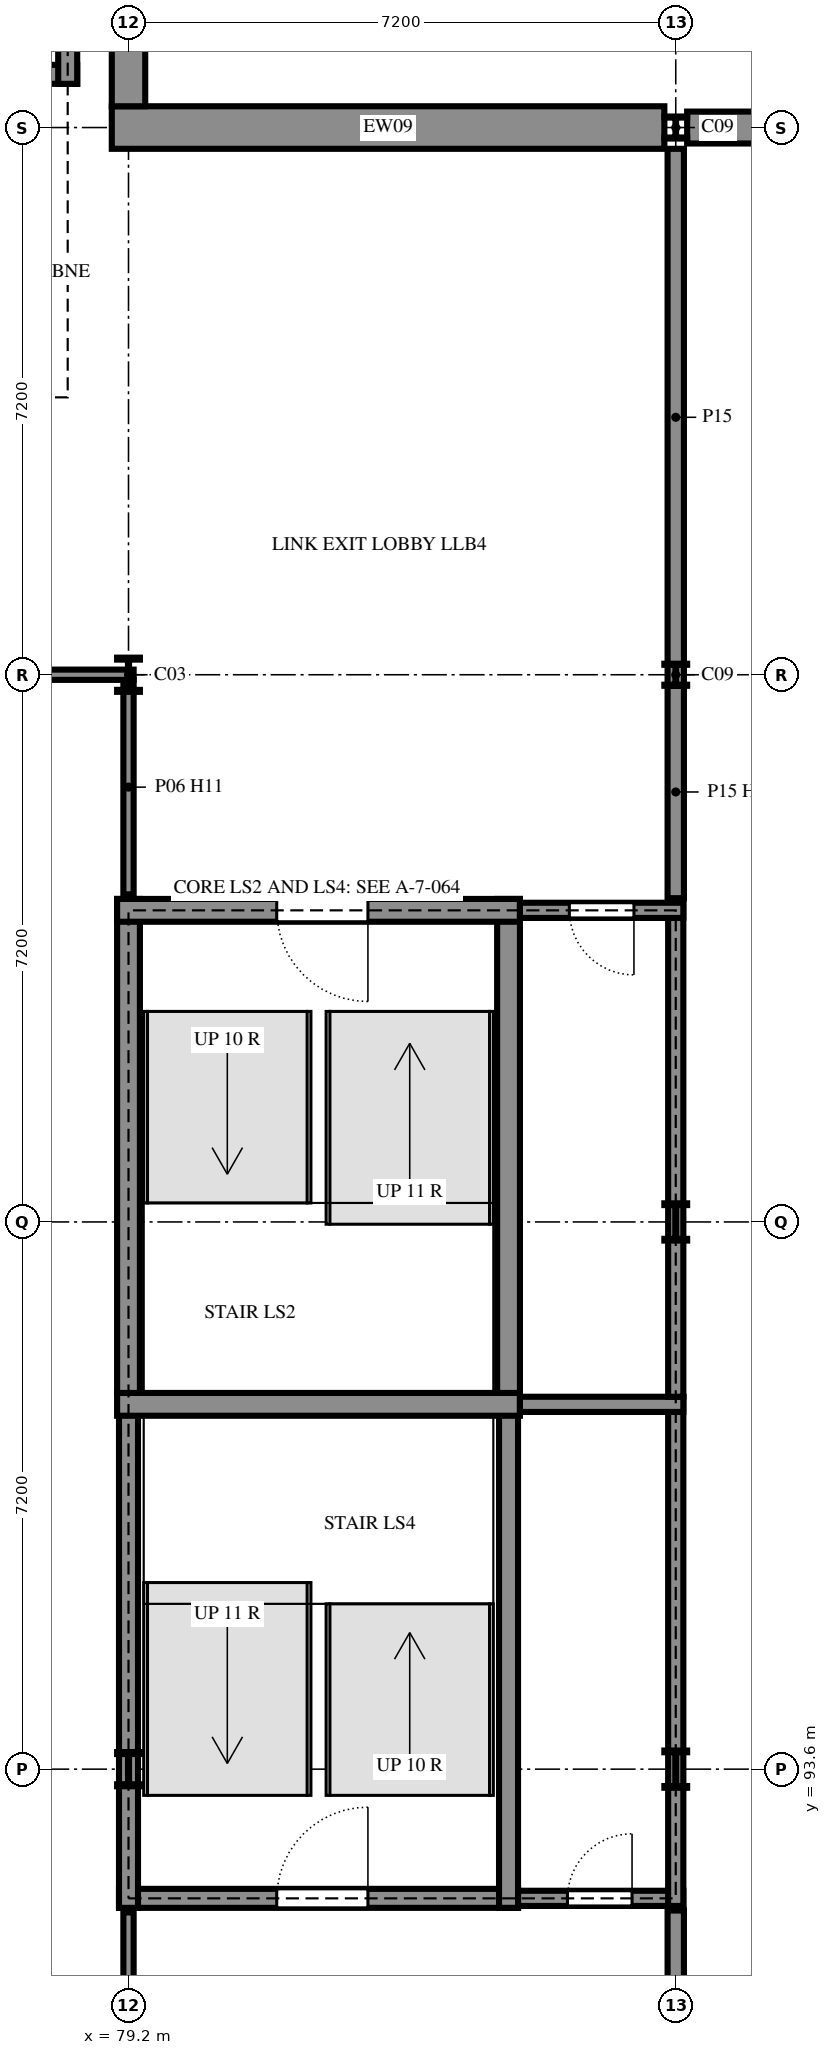
"""IFC4 building model, lengths in metres.
Left out: names, types, materials, properties, quantities, classifications, styles, units other than length and angle.
Written with IfcOpenShell. Run it as: python <this file> out.ifc"""

import sys

from ifc_helpers import new_model, si_unit, direction, frame, frame_2d, origin, origin_2d, place, context, subcontext, project, spatial, rectangle, i_section, extrude, element, fill, save


model = new_model("IFC4")
c1 = context("Model", 3, precision=1e-05, world=origin(), true_north=direction((0.0, 1.0)))
c2 = subcontext(c1, "Body", "Model", "MODEL_VIEW")
j1 = project(units=[si_unit("LENGTHUNIT", "METRE"), si_unit("PLANEANGLEUNIT", "RADIAN")], contexts=[c1])
p1 = place(None, origin())
s1 = spatial("IfcSite", under=j1, at=p1, CompositionType="ELEMENT")
p2 = place(p1, origin())
s2 = spatial("IfcBuilding", under=s1, at=p2, CompositionType="ELEMENT")
p3 = place(p2, frame((0.0, 0.0, 3.6)))
s3 = spatial("IfcBuildingStorey", under=s2, at=p3, CompositionType="ELEMENT", Elevation=3.6)
for number, where, z_axis, x_axis in (
    (1, (79.2, 93.6, 0.0), (0.0, 0.0, 1.0), (1.0, 0.0, 0.0)),
    (2, (79.2, 108.0, 0.0), (0.0, 0.0, 1.0), (1.0, 0.0, 0.0)),
):
    element("IfcColumn", number, at=place(p3, frame(where, z_axis=z_axis, x_axis=x_axis)), inside=s3, PredefinedType="COLUMN", context=c2, shape_type="SweptSolid", body=[
        extrude(i_section(OverallWidth=0.3, OverallDepth=0.45, WebThickness=0.014, FlangeThickness=0.026, FilletRadius=0.027, at=origin_2d()), origin(), (0.0, 0.0, 1.0), 3.6),
    ])
for number, where, z_axis, x_axis in (
    (3, (86.4, 93.6, 0.0), (0.0, 0.0, 1.0), (1.0, 0.0, 0.0)),
    (4, (86.4, 100.8, 0.0), (0.0, 0.0, 1.0), (1.0, 0.0, 0.0)),
):
    element("IfcColumn", number, at=place(p3, frame(where, z_axis=z_axis, x_axis=x_axis)), inside=s3, PredefinedType="COLUMN", context=c2, shape_type="SweptSolid", body=[
        extrude(i_section(OverallWidth=0.3, OverallDepth=0.49, WebThickness=0.012, FlangeThickness=0.023, FilletRadius=0.027, at=origin_2d()), origin(), (0.0, 0.0, 1.0), 3.6),
    ])
for number, where, z_axis, x_axis in (
    (5, (86.4, 108.0, 0.0), (0.0, 0.0, 1.0), (1.0, 0.0, 0.0)),
    (6, (86.4, 115.2, 0.0), (0.0, 0.0, 1.0), (1.0, 0.0, 0.0)),
):
    element("IfcColumn", number, at=place(p3, frame(where, z_axis=z_axis, x_axis=x_axis)), inside=s3, PredefinedType="COLUMN", context=c2, shape_type="SweptSolid", body=[
        extrude(i_section(OverallWidth=0.3, OverallDepth=0.29, WebThickness=0.009, FlangeThickness=0.014, FilletRadius=0.027, at=origin_2d()), origin(), (0.0, 0.0, 1.0), 3.6),
    ])
p4 = place(p3, frame((79.075, 91.9, 0.0), z_axis=(0.0, 0.0, 1.0), x_axis=(1.0, 0.0, 0.0)))
e7 = element("IfcWall", 7, at=p4, inside=s3, PredefinedType="SHEAR", context=c2, shape_type="SweptSolid", body=[
    extrude(rectangle(XDim=5.25, YDim=0.25, at=frame_2d((2.625, 0.0))), origin(), (0.0, 0.0, 1.0), 3.6),
])
p5 = place(p4, frame((2.075, 0.0, 0.0)))
e8 = element("IfcOpeningElement", 8, at=p5, cuts=e7, PredefinedType="OPENING", context=c2, shape_type="SweptSolid", body=[
    extrude(rectangle(XDim=1.2, YDim=2.4, at=frame_2d((0.6, 1.2))), frame((0.0, 0.135, 0.0), z_axis=(0.0, -1.0, 0.0), x_axis=(1.0, 0.0, 0.0)), (0.0, 0.0, 1.0), 0.27),
])
p6 = place(p3, frame((84.325, 91.9, 0.0), z_axis=(0.0, 0.0, 1.0), x_axis=(1.0, 0.0, 0.0)))
e9 = element("IfcWall", 9, at=p6, inside=s3, PredefinedType="SHEAR", context=c2, shape_type="SweptSolid", body=[
    extrude(rectangle(XDim=2.175, YDim=0.2, at=frame_2d((1.087, 0.0))), origin(), (0.0, 0.0, 1.0), 3.6),
])
p7 = place(p6, frame((0.65, 0.0, 0.0)))
e10 = element("IfcOpeningElement", 10, at=p7, cuts=e9, PredefinedType="OPENING", context=c2, shape_type="SweptSolid", body=[
    extrude(rectangle(XDim=0.85, YDim=2.1, at=frame_2d((0.425, 1.05))), frame((0.0, 0.11, 0.0), z_axis=(0.0, -1.0, 0.0), x_axis=(1.0, 0.0, 0.0)), (0.0, 0.0, 1.0), 0.22),
])
p8 = place(p3, frame((84.2, 91.775, 0.0), z_axis=(0.0, 0.0, 1.0), x_axis=(0.0, 1.0, 0.0)))
e11 = element("IfcWall", 11, at=p8, inside=s3, PredefinedType="SHEAR", context=c2, shape_type="SweptSolid", body=[
    extrude(rectangle(XDim=6.775, YDim=0.25, at=frame_2d((3.388, 0.0))), origin(), (0.0, 0.0, 1.0), 3.6),
])
p9 = place(p3, frame((86.4, 91.8, 0.0), z_axis=(0.0, 0.0, 1.0), x_axis=(0.0, 1.0, 0.0)))
e12 = element("IfcWall", 12, at=p9, inside=s3, PredefinedType="SHEAR", context=c2, shape_type="SweptSolid", body=[
    extrude(rectangle(XDim=6.7, YDim=0.2, at=frame_2d((3.35, 0.0))), origin(), (0.0, 0.0, 1.0), 3.6),
])
p10 = place(p3, frame((79.2, 98.55, 0.0), z_axis=(0.0, 0.0, 1.0), x_axis=(0.0, -1.0, 0.0)))
e13 = element("IfcWall", 13, at=p10, inside=s3, PredefinedType="SHEAR", context=c2, shape_type="SweptSolid", body=[
    extrude(rectangle(XDim=6.775, YDim=0.25, at=frame_2d((3.388, 0.0))), origin(), (0.0, 0.0, 1.0), 3.6),
])
p11 = place(p3, frame((84.35, 98.4, 0.0), z_axis=(0.0, 0.0, 1.0), x_axis=(-1.0, 0.0, 0.0)))
e14 = element("IfcWall", 14, at=p11, inside=s3, PredefinedType="SHEAR", context=c2, shape_type="SweptSolid", body=[
    extrude(rectangle(XDim=5.3, YDim=0.3, at=frame_2d((2.65, 0.0))), origin(), (0.0, 0.0, 1.0), 3.6),
])
p12 = place(p3, frame((84.35, 98.4, 0.0), z_axis=(0.0, 0.0, 1.0), x_axis=(1.0, 0.0, 0.0)))
e15 = element("IfcWall", 15, at=p12, inside=s3, PredefinedType="SHEAR", context=c2, shape_type="SweptSolid", body=[
    extrude(rectangle(XDim=2.15, YDim=0.2, at=frame_2d((1.075, 0.0))), origin(), (0.0, 0.0, 1.0), 3.6),
])
p13 = place(p3, frame((84.2, 98.55, 0.0), z_axis=(0.0, 0.0, 1.0), x_axis=(0.0, 1.0, 0.0)))
e16 = element("IfcWall", 16, at=p13, inside=s3, PredefinedType="SHEAR", context=c2, shape_type="SweptSolid", body=[
    extrude(rectangle(XDim=6.5, YDim=0.3, at=frame_2d((3.25, 0.0))), origin(), (0.0, 0.0, 1.0), 3.6),
])
p14 = place(p3, frame((86.4, 98.5, 0.0), z_axis=(0.0, 0.0, 1.0), x_axis=(0.0, 1.0, 0.0)))
e17 = element("IfcWall", 17, at=p14, inside=s3, PredefinedType="SHEAR", context=c2, shape_type="SweptSolid", body=[
    extrude(rectangle(XDim=6.5, YDim=0.2, at=frame_2d((3.25, 0.0))), origin(), (0.0, 0.0, 1.0), 3.6),
])
p15 = place(p3, frame((79.2, 105.05, 0.0), z_axis=(0.0, 0.0, 1.0), x_axis=(0.0, -1.0, 0.0)))
e18 = element("IfcWall", 18, at=p15, inside=s3, PredefinedType="SHEAR", context=c2, shape_type="SweptSolid", body=[
    extrude(rectangle(XDim=6.5, YDim=0.3, at=frame_2d((3.25, 0.0))), origin(), (0.0, 0.0, 1.0), 3.6),
])
p16 = place(p3, frame((84.35, 104.9, 0.0), z_axis=(0.0, 0.0, 1.0), x_axis=(-1.0, 0.0, 0.0)))
e19 = element("IfcWall", 19, at=p16, inside=s3, PredefinedType="SHEAR", context=c2, shape_type="SweptSolid", body=[
    extrude(rectangle(XDim=5.3, YDim=0.3, at=frame_2d((2.65, 0.0))), origin(), (0.0, 0.0, 1.0), 3.6),
])
p17 = place(p16, frame((2.0, 0.0, 0.0)))
e20 = element("IfcOpeningElement", 20, at=p17, cuts=e19, PredefinedType="OPENING", context=c2, shape_type="SweptSolid", body=[
    extrude(rectangle(XDim=1.2, YDim=2.4, at=frame_2d((0.6, 1.2))), frame((0.0, 0.16, 0.0), z_axis=(0.0, -1.0, 0.0), x_axis=(1.0, 0.0, 0.0)), (0.0, 0.0, 1.0), 0.32),
])
p18 = place(p3, frame((86.5, 104.9, 0.0), z_axis=(0.0, 0.0, 1.0), x_axis=(-1.0, 0.0, 0.0)))
e21 = element("IfcWall", 21, at=p18, inside=s3, PredefinedType="SHEAR", context=c2, shape_type="SweptSolid", body=[
    extrude(rectangle(XDim=2.15, YDim=0.2, at=frame_2d((1.075, 0.0))), origin(), (0.0, 0.0, 1.0), 3.6),
])
p19 = place(p18, frame((0.65, 0.0, 0.0)))
e22 = element("IfcOpeningElement", 22, at=p19, cuts=e21, PredefinedType="OPENING", context=c2, shape_type="SweptSolid", body=[
    extrude(rectangle(XDim=0.85, YDim=2.1, at=frame_2d((0.425, 1.05))), frame((0.0, 0.11, 0.0), z_axis=(0.0, -1.0, 0.0), x_axis=(1.0, 0.0, 0.0)), (0.0, 0.0, 1.0), 0.22),
])
p20 = place(p3, frame((73.525, 115.9, 0.0), z_axis=(0.0, 0.0, 1.0), x_axis=(1.0, 0.0, 0.0)))
e23 = element("IfcWall", 23, at=p20, inside=s3, PredefinedType="SHEAR", context=c2, shape_type="SweptSolid", body=[
    extrude(rectangle(XDim=5.0, YDim=0.25, at=frame_2d((2.5, 0.0))), origin(), (0.0, 0.0, 1.0), 3.6),
])
p21 = place(p20, frame((1.825, 0.0, 0.0)))
e24 = element("IfcOpeningElement", 24, at=p21, cuts=e23, PredefinedType="OPENING", context=c2, shape_type="SweptSolid", body=[
    extrude(rectangle(XDim=1.2, YDim=2.4, at=frame_2d((0.6, 1.2))), frame((0.0, 0.135, 0.0), z_axis=(0.0, -1.0, 0.0), x_axis=(1.0, 0.0, 0.0)), (0.0, 0.0, 1.0), 0.27),
])
p22 = place(p3, frame((78.4, 115.775, 0.0), z_axis=(0.0, 0.0, 1.0), x_axis=(0.0, 1.0, 0.0)))
e25 = element("IfcWall", 25, at=p22, inside=s3, PredefinedType="SHEAR", context=c2, shape_type="SweptSolid", body=[
    extrude(rectangle(XDim=6.75, YDim=0.25, at=frame_2d((3.375, 0.0))), origin(), (0.0, 0.0, 1.0), 3.6),
])
p23 = place(p3, frame((93.45, 115.2, 0.0), z_axis=(0.0, 0.0, 1.0), x_axis=(-1.0, 0.0, 0.0)))
e26 = element("IfcWall", 26, at=p23, inside=s3, PredefinedType="SOLIDWALL", context=c2, shape_type="SweptSolid", body=[
    extrude(rectangle(XDim=6.9, YDim=0.42, at=frame_2d((3.45, 0.0))), origin(), (0.0, 0.0, 1.0), 3.6),
])
p24 = place(p3, frame((86.25, 115.2, 0.0), z_axis=(0.0, 0.0, 1.0), x_axis=(-1.0, 0.0, 0.0)))
e27 = element("IfcWall", 27, at=p24, inside=s3, PredefinedType="SOLIDWALL", context=c2, shape_type="SweptSolid", body=[
    extrude(rectangle(XDim=7.27, YDim=0.56, at=frame_2d((3.635, 0.0))), origin(), (0.0, 0.0, 1.0), 3.12),
])
p25 = place(p3, frame((79.2, 115.48, 0.0), z_axis=(0.0, 0.0, 1.0), x_axis=(0.0, 1.0, 0.0)))
e28 = element("IfcWall", 28, at=p25, inside=s3, PredefinedType="SOLIDWALL", context=c2, shape_type="SweptSolid", body=[
    extrude(rectangle(XDim=6.704, YDim=0.44, at=frame_2d((3.352, 0.0))), origin(), (0.0, 0.0, 1.0), 2.82),
])
p26 = place(p3, frame((79.2, 91.715, 0.0), z_axis=(0.0, 0.0, 1.0), x_axis=(0.0, -1.0, 0.0)))
e29 = element("IfcWall", 29, at=p26, inside=s3, PredefinedType="PARTITIONING", context=c2, shape_type="SweptSolid", body=[
    extrude(rectangle(XDim=5.248, YDim=0.135, at=frame_2d((2.624, 0.0))), origin(), (0.0, 0.0, 1.0), 2.87),
])
p27 = place(p3, frame((86.4, 80.4, 0.0), z_axis=(0.0, 0.0, 1.0), x_axis=(0.0, 1.0, 0.0)))
e30 = element("IfcWall", 30, at=p27, inside=s3, PredefinedType="PARTITIONING", context=c2, shape_type="SweptSolid", body=[
    extrude(rectangle(XDim=11.34, YDim=0.215, at=frame_2d((5.67, 0.0))), origin(), (0.0, 0.0, 1.0), 3.12),
])
p28 = place(p3, frame((79.2, 107.933, 0.0), z_axis=(0.0, 0.0, 1.0), x_axis=(0.0, -1.0, 0.0)))
e31 = element("IfcWall", 31, at=p28, inside=s3, PredefinedType="PARTITIONING", context=c2, shape_type="SweptSolid", body=[
    extrude(rectangle(XDim=2.823, YDim=0.135, at=frame_2d((1.411, 0.0))), origin(), (0.0, 0.0, 1.0), 3.22),
])
p29 = place(p3, frame((86.4, 105.06, 0.0), z_axis=(0.0, 0.0, 1.0), x_axis=(0.0, 1.0, 0.0)))
e32 = element("IfcWall", 32, at=p29, inside=s3, PredefinedType="PARTITIONING", context=c2, shape_type="SweptSolid", body=[
    extrude(rectangle(XDim=2.795, YDim=0.215, at=frame_2d((1.397, 0.0))), origin(), (0.0, 0.0, 1.0), 3.6),
])
p30 = place(p3, frame((71.333, 108.0, 0.0), z_axis=(0.0, 0.0, 1.0), x_axis=(1.0, 0.0, 0.0)))
e33 = element("IfcWall", 33, at=p30, inside=s3, PredefinedType="PARTITIONING", context=c2, shape_type="SweptSolid", body=[
    extrude(rectangle(XDim=7.935, YDim=0.135, at=frame_2d((3.968, 0.0))), origin(), (0.0, 0.0, 1.0), 2.82),
])
p31 = place(p3, frame((86.4, 107.855, 0.0), z_axis=(0.0, 0.0, 1.0), x_axis=(0.0, 1.0, 0.0)))
e34 = element("IfcWall", 34, at=p31, inside=s3, PredefinedType="PARTITIONING", context=c2, shape_type="SweptSolid", body=[
    extrude(rectangle(XDim=7.065, YDim=0.215, at=frame_2d((3.532, 0.0))), origin(), (0.0, 0.0, 1.0), 3.12),
])
p32 = place(p5, origin())
e35 = element("IfcDoor", 35, at=p32, inside=s3, OperationType="SINGLE_SWING_LEFT", PredefinedType="DOOR", context=c2, shape_type="SweptSolid", body=[
    extrude(rectangle(XDim=1.2, YDim=2.4, at=frame_2d((0.6, 1.2))), frame((0.0, 0.025, 0.0), z_axis=(0.0, -1.0, 0.0), x_axis=(1.0, 0.0, 0.0)), (0.0, 0.0, 1.0), 0.05),
])
fill(e8, e35)
p33 = place(p17, origin())
e36 = element("IfcDoor", 36, at=p33, inside=s3, OperationType="SINGLE_SWING_RIGHT", PredefinedType="DOOR", context=c2, shape_type="SweptSolid", body=[
    extrude(rectangle(XDim=1.2, YDim=2.4, at=frame_2d((0.6, 1.2))), frame((0.0, 0.025, 0.0), z_axis=(0.0, -1.0, 0.0), x_axis=(1.0, 0.0, 0.0)), (0.0, 0.0, 1.0), 0.05),
])
fill(e20, e36)
p34 = place(p19, origin())
e37 = element("IfcDoor", 37, at=p34, inside=s3, OperationType="SINGLE_SWING_RIGHT", PredefinedType="DOOR", context=c2, shape_type="SweptSolid", body=[
    extrude(rectangle(XDim=0.85, YDim=2.1, at=frame_2d((0.425, 1.05))), frame((0.0, 0.025, 0.0), z_axis=(0.0, -1.0, 0.0), x_axis=(1.0, 0.0, 0.0)), (0.0, 0.0, 1.0), 0.05),
])
fill(e22, e37)
p35 = place(p7, origin())
e38 = element("IfcDoor", 38, at=p35, inside=s3, OperationType="SINGLE_SWING_LEFT", PredefinedType="DOOR", context=c2, shape_type="SweptSolid", body=[
    extrude(rectangle(XDim=0.85, YDim=2.1, at=frame_2d((0.425, 1.05))), frame((0.0, 0.025, 0.0), z_axis=(0.0, -1.0, 0.0), x_axis=(1.0, 0.0, 0.0)), (0.0, 0.0, 1.0), 0.05),
])
fill(e10, e38)
save(model, sys.argv[1])
